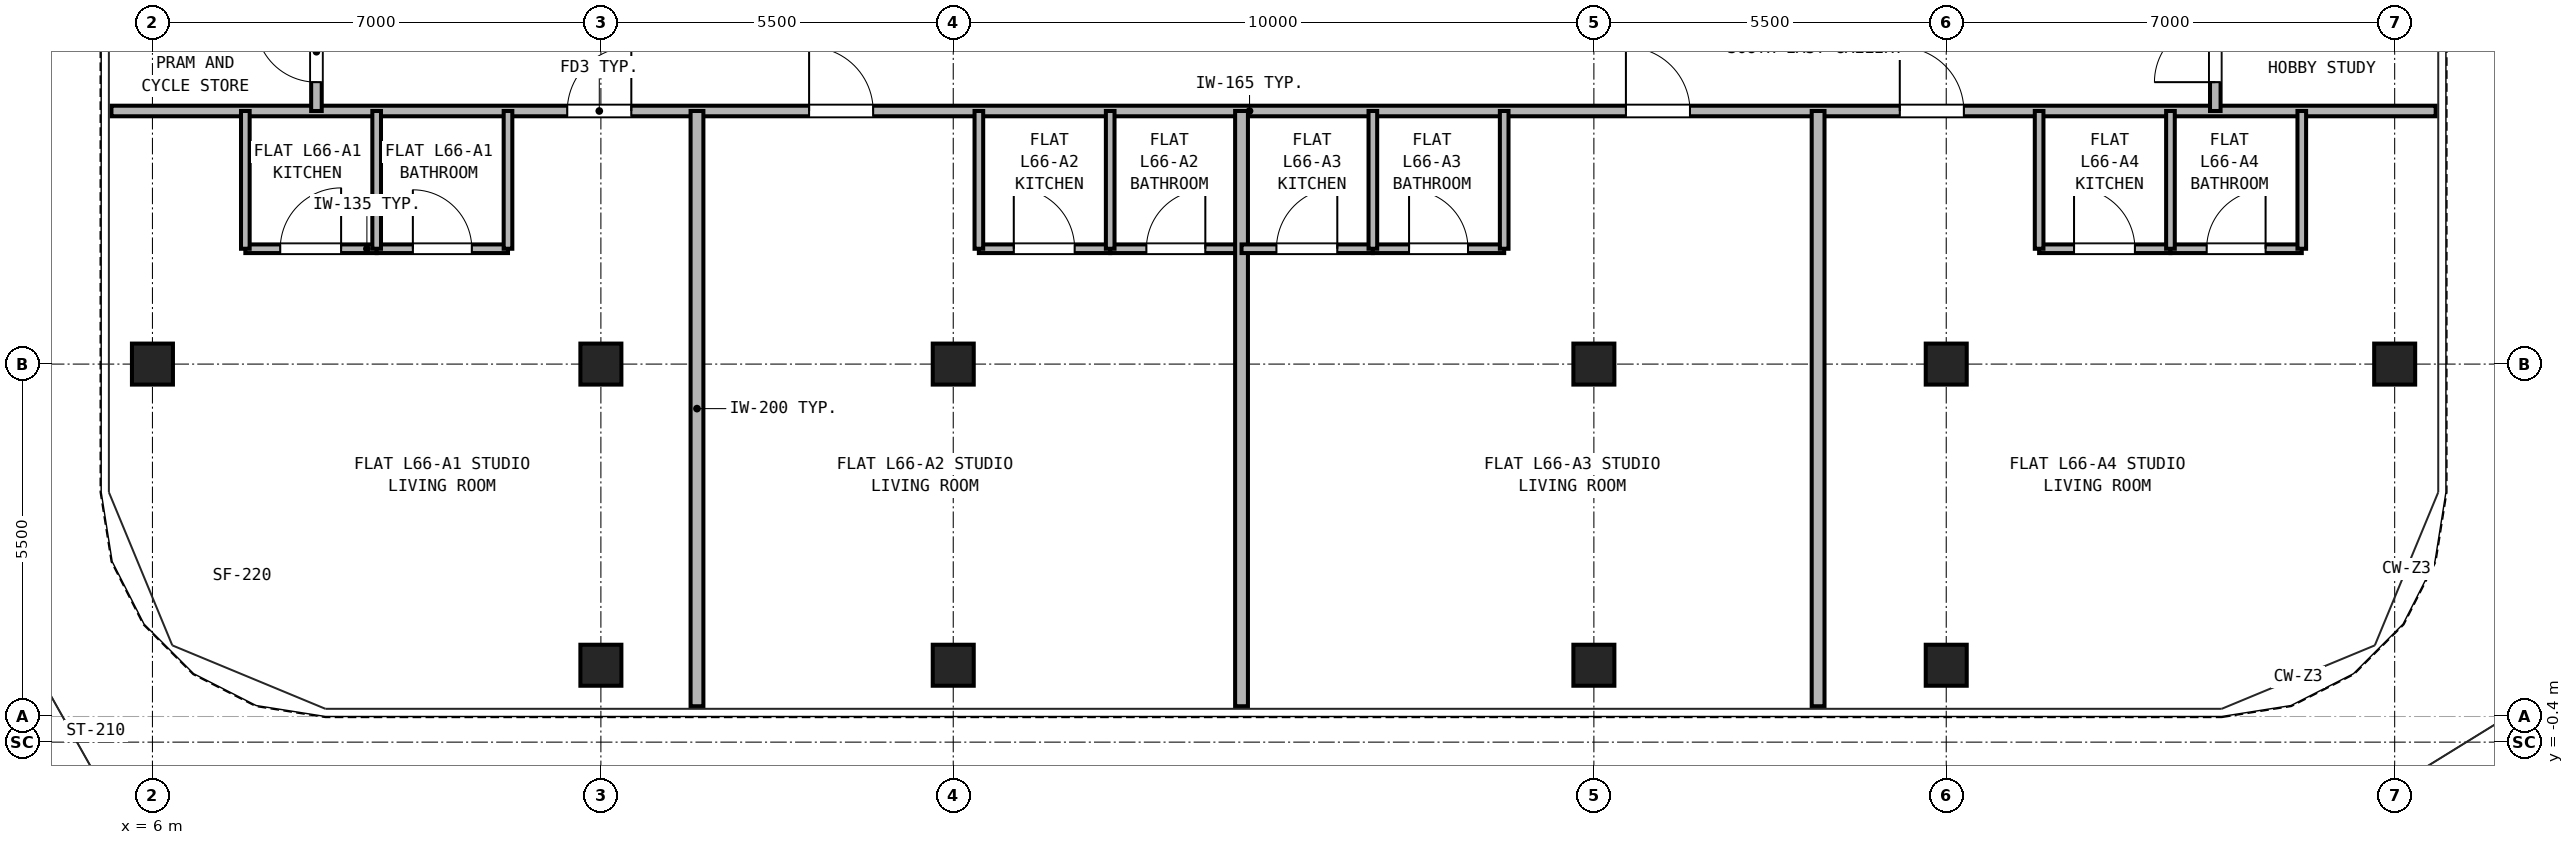
"""IFC4 building model, lengths in metres.
Left out: names, types, materials, properties, quantities, classifications, styles, units other than length and angle.
Written with IfcOpenShell. Run it as: python <this file> out.ifc"""

import sys

from ifc_helpers import new_model, si_unit, direction, frame, frame_2d, origin, origin_2d, place, context, subcontext, project, spatial, rectangle, hollow_rectangle, extrude, source, transform, mapped, element, fill, save


model = new_model("IFC4")
c1 = context("Model", 3, precision=1e-05, world=origin(), true_north=direction((0.0, 1.0)))
c2 = subcontext(c1, "Body", "Model", "MODEL_VIEW")
j1 = project(units=[si_unit("LENGTHUNIT", "METRE"), si_unit("PLANEANGLEUNIT", "RADIAN")], contexts=[c1])
p1 = place(None, origin())
s1 = spatial("IfcSite", under=j1, at=p1, CompositionType="ELEMENT")
p2 = place(p1, origin())
s2 = spatial("IfcBuilding", under=s1, at=p2, CompositionType="ELEMENT")
p3 = place(p2, frame((0.0, 0.0, 232.9)))
s3 = spatial("IfcBuildingStorey", under=s2, at=p3, CompositionType="ELEMENT", Elevation=232.9)
m1 = source(origin(), c2, "Body", "SweptSolid", [
    extrude(hollow_rectangle(XDim=0.64, YDim=0.64, WallThickness=0.035, at=origin_2d()), origin(), (0.0, 0.0, 1.0), 2.98),
])
for number, where, z_axis, x_axis in (
    (1, (13.0, 0.8, 0.0), (0.0, 0.0, 1.0), (1.0, 0.0, 0.0)),
    (2, (18.5, 0.8, 0.0), (0.0, 0.0, 1.0), (1.0, 0.0, 0.0)),
    (3, (28.5, 0.8, 0.0), (0.0, 0.0, 1.0), (1.0, 0.0, 0.0)),
    (4, (34.0, 0.8, 0.0), (0.0, 0.0, 1.0), (1.0, 0.0, 0.0)),
    (5, (6.0, 5.5, 0.0), (0.0, 0.0, 1.0), (1.0, 0.0, 0.0)),
    (6, (41.0, 5.5, 0.0), (0.0, 0.0, 1.0), (1.0, 0.0, 0.0)),
    (7, (13.0, 5.5, 0.0), (0.0, 0.0, 1.0), (1.0, 0.0, 0.0)),
    (8, (18.5, 5.5, 0.0), (0.0, 0.0, 1.0), (1.0, 0.0, 0.0)),
    (9, (28.5, 5.5, 0.0), (0.0, 0.0, 1.0), (1.0, 0.0, 0.0)),
    (10, (34.0, 5.5, 0.0), (0.0, 0.0, 1.0), (1.0, 0.0, 0.0)),
):
    element("IfcColumn", number, at=place(p3, frame(where, z_axis=z_axis, x_axis=x_axis)), inside=s3, PredefinedType="COLUMN", context=c2, shape_type="MappedRepresentation", body=[
        mapped(m1, transform((0.0, 0.0, 0.0), x_axis=(1.0, 0.0, 0.0), y_axis=(0.0, 1.0, 0.0), z_axis=(0.0, 0.0, 1.0), scale=1.0)),
    ])
p4 = place(p3, frame((5.36, 9.45, 0.0), z_axis=(0.0, 0.0, 1.0), x_axis=(1.0, 0.0, 0.0)))
e11 = element("IfcWall", 11, at=p4, inside=s3, PredefinedType="PARTITIONING", context=c2, shape_type="SweptSolid", body=[
    extrude(rectangle(XDim=36.28, YDim=0.165, at=frame_2d((18.14, 0.0))), origin(), (0.0, 0.0, 1.0), 2.98),
])
p5 = place(p4, frame((7.115, 0.0, 0.0)))
e12 = element("IfcOpeningElement", 12, at=p5, cuts=e11, PredefinedType="OPENING", context=c2, shape_type="SweptSolid", body=[
    extrude(rectangle(XDim=1.0, YDim=2.15, at=frame_2d((0.5, 1.075))), frame((0.0, 0.093, 0.0), z_axis=(0.0, -1.0, 0.0), x_axis=(1.0, 0.0, 0.0)), (0.0, 0.0, 1.0), 0.185),
])
p6 = place(p4, frame((10.89, 0.0, 0.0)))
e13 = element("IfcOpeningElement", 13, at=p6, cuts=e11, PredefinedType="OPENING", context=c2, shape_type="SweptSolid", body=[
    extrude(rectangle(XDim=1.0, YDim=2.15, at=frame_2d((0.5, 1.075))), frame((0.0, 0.093, 0.0), z_axis=(0.0, -1.0, 0.0), x_axis=(1.0, 0.0, 0.0)), (0.0, 0.0, 1.0), 0.185),
])
p7 = place(p4, frame((23.64, 0.0, 0.0)))
e14 = element("IfcOpeningElement", 14, at=p7, cuts=e11, PredefinedType="OPENING", context=c2, shape_type="SweptSolid", body=[
    extrude(rectangle(XDim=1.0, YDim=2.15, at=frame_2d((0.5, 1.075))), frame((0.0, 0.093, 0.0), z_axis=(0.0, -1.0, 0.0), x_axis=(1.0, 0.0, 0.0)), (0.0, 0.0, 1.0), 0.185),
])
p8 = place(p4, frame((27.915, 0.0, 0.0)))
e15 = element("IfcOpeningElement", 15, at=p8, cuts=e11, PredefinedType="OPENING", context=c2, shape_type="SweptSolid", body=[
    extrude(rectangle(XDim=1.0, YDim=2.15, at=frame_2d((0.5, 1.075))), frame((0.0, 0.093, 0.0), z_axis=(0.0, -1.0, 0.0), x_axis=(1.0, 0.0, 0.0)), (0.0, 0.0, 1.0), 0.185),
])
p9 = place(p3, frame((8.56, 9.45, 0.0), z_axis=(0.0, 0.0, 1.0), x_axis=(0.0, 1.0, 0.0)))
e16 = element("IfcWall", 16, at=p9, inside=s3, PredefinedType="PARTITIONING", context=c2, shape_type="SweptSolid", body=[
    extrude(rectangle(XDim=2.0, YDim=0.165, at=frame_2d((1.0, 0.0))), origin(), (0.0, 0.0, 1.0), 2.98),
])
p10 = place(p9, frame((0.45, 0.0, 0.0)))
e17 = element("IfcOpeningElement", 17, at=p10, cuts=e16, PredefinedType="OPENING", context=c2, shape_type="SweptSolid", body=[
    extrude(rectangle(XDim=0.95, YDim=2.15, at=frame_2d((0.475, 1.075))), frame((0.0, 0.093, 0.0), z_axis=(0.0, -1.0, 0.0), x_axis=(1.0, 0.0, 0.0)), (0.0, 0.0, 1.0), 0.185),
])
p11 = place(p3, frame((38.2, 9.45, 0.0), z_axis=(0.0, 0.0, 1.0), x_axis=(0.0, 1.0, 0.0)))
e18 = element("IfcWall", 18, at=p11, inside=s3, PredefinedType="PARTITIONING", context=c2, shape_type="SweptSolid", body=[
    extrude(rectangle(XDim=2.0, YDim=0.165, at=frame_2d((1.0, 0.0))), origin(), (0.0, 0.0, 1.0), 2.98),
])
p12 = place(p11, frame((0.45, 0.0, 0.0)))
e19 = element("IfcOpeningElement", 19, at=p12, cuts=e18, PredefinedType="OPENING", context=c2, shape_type="SweptSolid", body=[
    extrude(rectangle(XDim=0.95, YDim=2.15, at=frame_2d((0.475, 1.075))), frame((0.0, 0.093, 0.0), z_axis=(0.0, -1.0, 0.0), x_axis=(1.0, 0.0, 0.0)), (0.0, 0.0, 1.0), 0.185),
])
p13 = place(p3, frame((7.45, 7.3, 0.0), z_axis=(0.0, 0.0, 1.0), x_axis=(1.0, 0.0, 0.0)))
e20 = element("IfcWall", 20, at=p13, inside=s3, PredefinedType="PARTITIONING", context=c2, shape_type="SweptSolid", body=[
    extrude(rectangle(XDim=2.05, YDim=0.135, at=frame_2d((1.025, 0.0))), origin(), (0.0, 0.0, 1.0), 2.98),
])
p14 = place(p13, frame((0.545, 0.0, 0.0)))
e21 = element("IfcOpeningElement", 21, at=p14, cuts=e20, PredefinedType="OPENING", context=c2, shape_type="SweptSolid", body=[
    extrude(rectangle(XDim=0.95, YDim=2.15, at=frame_2d((0.475, 1.075))), frame((0.0, 0.077, 0.0), z_axis=(0.0, -1.0, 0.0), x_axis=(1.0, 0.0, 0.0)), (0.0, 0.0, 1.0), 0.155),
])
p15 = place(p3, frame((9.5, 7.3, 0.0), z_axis=(0.0, 0.0, 1.0), x_axis=(1.0, 0.0, 0.0)))
e22 = element("IfcWall", 22, at=p15, inside=s3, PredefinedType="PARTITIONING", context=c2, shape_type="SweptSolid", body=[
    extrude(rectangle(XDim=2.05, YDim=0.135, at=frame_2d((1.025, 0.0))), origin(), (0.0, 0.0, 1.0), 2.98),
])
p16 = place(p15, frame((0.565, 0.0, 0.0)))
e23 = element("IfcOpeningElement", 23, at=p16, cuts=e22, PredefinedType="OPENING", context=c2, shape_type="SweptSolid", body=[
    extrude(rectangle(XDim=0.92, YDim=2.1, at=frame_2d((0.46, 1.05))), frame((0.0, 0.077, 0.0), z_axis=(0.0, -1.0, 0.0), x_axis=(1.0, 0.0, 0.0)), (0.0, 0.0, 1.0), 0.155),
])
for number, where, z_axis, x_axis in (
    (24, (7.45, 7.3, 0.0), (0.0, 0.0, 1.0), (0.0, 1.0, 0.0)),
    (25, (9.5, 7.3, 0.0), (0.0, 0.0, 1.0), (0.0, 1.0, 0.0)),
    (26, (11.55, 7.3, 0.0), (0.0, 0.0, 1.0), (0.0, 1.0, 0.0)),
):
    element("IfcWall", number, at=place(p3, frame(where, z_axis=z_axis, x_axis=x_axis)), inside=s3, PredefinedType="PARTITIONING", context=c2, shape_type="SweptSolid", body=[
        extrude(rectangle(XDim=2.15, YDim=0.135, at=frame_2d((1.075, 0.0))), origin(), (0.0, 0.0, 1.0), 2.98),
    ])
p17 = place(p3, frame((14.5, 0.16, 0.0), z_axis=(0.0, 0.0, 1.0), x_axis=(0.0, 1.0, 0.0)))
e27 = element("IfcWall", 27, at=p17, inside=s3, PredefinedType="PARTITIONING", context=c2, shape_type="SweptSolid", body=[
    extrude(rectangle(XDim=9.29, YDim=0.2, at=frame_2d((4.645, 0.0))), origin(), (0.0, 0.0, 1.0), 2.98),
])
p18 = place(p3, frame((18.9, 7.3, 0.0), z_axis=(0.0, 0.0, 1.0), x_axis=(1.0, 0.0, 0.0)))
e28 = element("IfcWall", 28, at=p18, inside=s3, PredefinedType="PARTITIONING", context=c2, shape_type="SweptSolid", body=[
    extrude(rectangle(XDim=2.05, YDim=0.135, at=frame_2d((1.025, 0.0))), origin(), (0.0, 0.0, 1.0), 2.98),
])
p19 = place(p18, frame((0.545, 0.0, 0.0)))
e29 = element("IfcOpeningElement", 29, at=p19, cuts=e28, PredefinedType="OPENING", context=c2, shape_type="SweptSolid", body=[
    extrude(rectangle(XDim=0.95, YDim=2.15, at=frame_2d((0.475, 1.075))), frame((0.0, 0.077, 0.0), z_axis=(0.0, -1.0, 0.0), x_axis=(1.0, 0.0, 0.0)), (0.0, 0.0, 1.0), 0.155),
])
p20 = place(p3, frame((20.95, 7.3, 0.0), z_axis=(0.0, 0.0, 1.0), x_axis=(1.0, 0.0, 0.0)))
e30 = element("IfcWall", 30, at=p20, inside=s3, PredefinedType="PARTITIONING", context=c2, shape_type="SweptSolid", body=[
    extrude(rectangle(XDim=2.05, YDim=0.135, at=frame_2d((1.025, 0.0))), origin(), (0.0, 0.0, 1.0), 2.98),
])
p21 = place(p20, frame((0.565, 0.0, 0.0)))
e31 = element("IfcOpeningElement", 31, at=p21, cuts=e30, PredefinedType="OPENING", context=c2, shape_type="SweptSolid", body=[
    extrude(rectangle(XDim=0.92, YDim=2.1, at=frame_2d((0.46, 1.05))), frame((0.0, 0.077, 0.0), z_axis=(0.0, -1.0, 0.0), x_axis=(1.0, 0.0, 0.0)), (0.0, 0.0, 1.0), 0.155),
])
for number, where, z_axis, x_axis in (
    (32, (18.9, 7.3, 0.0), (0.0, 0.0, 1.0), (0.0, 1.0, 0.0)),
    (33, (20.95, 7.3, 0.0), (0.0, 0.0, 1.0), (0.0, 1.0, 0.0)),
):
    element("IfcWall", number, at=place(p3, frame(where, z_axis=z_axis, x_axis=x_axis)), inside=s3, PredefinedType="PARTITIONING", context=c2, shape_type="SweptSolid", body=[
        extrude(rectangle(XDim=2.15, YDim=0.135, at=frame_2d((1.075, 0.0))), origin(), (0.0, 0.0, 1.0), 2.98),
    ])
p22 = place(p3, frame((23.0, 0.16, 0.0), z_axis=(0.0, 0.0, 1.0), x_axis=(0.0, 1.0, 0.0)))
e34 = element("IfcWall", 34, at=p22, inside=s3, PredefinedType="PARTITIONING", context=c2, shape_type="SweptSolid", body=[
    extrude(rectangle(XDim=9.29, YDim=0.2, at=frame_2d((4.645, 0.0))), origin(), (0.0, 0.0, 1.0), 2.98),
])
p23 = place(p3, frame((23.0, 7.3, 0.0), z_axis=(0.0, 0.0, 1.0), x_axis=(1.0, 0.0, 0.0)))
e35 = element("IfcWall", 35, at=p23, inside=s3, PredefinedType="PARTITIONING", context=c2, shape_type="SweptSolid", body=[
    extrude(rectangle(XDim=2.05, YDim=0.135, at=frame_2d((1.025, 0.0))), origin(), (0.0, 0.0, 1.0), 2.98),
])
p24 = place(p23, frame((0.545, 0.0, 0.0)))
e36 = element("IfcOpeningElement", 36, at=p24, cuts=e35, PredefinedType="OPENING", context=c2, shape_type="SweptSolid", body=[
    extrude(rectangle(XDim=0.95, YDim=2.15, at=frame_2d((0.475, 1.075))), frame((0.0, 0.077, 0.0), z_axis=(0.0, -1.0, 0.0), x_axis=(1.0, 0.0, 0.0)), (0.0, 0.0, 1.0), 0.155),
])
p25 = place(p3, frame((25.05, 7.3, 0.0), z_axis=(0.0, 0.0, 1.0), x_axis=(1.0, 0.0, 0.0)))
e37 = element("IfcWall", 37, at=p25, inside=s3, PredefinedType="PARTITIONING", context=c2, shape_type="SweptSolid", body=[
    extrude(rectangle(XDim=2.05, YDim=0.135, at=frame_2d((1.025, 0.0))), origin(), (0.0, 0.0, 1.0), 2.98),
])
p26 = place(p25, frame((0.565, 0.0, 0.0)))
e38 = element("IfcOpeningElement", 38, at=p26, cuts=e37, PredefinedType="OPENING", context=c2, shape_type="SweptSolid", body=[
    extrude(rectangle(XDim=0.92, YDim=2.1, at=frame_2d((0.46, 1.05))), frame((0.0, 0.077, 0.0), z_axis=(0.0, -1.0, 0.0), x_axis=(1.0, 0.0, 0.0)), (0.0, 0.0, 1.0), 0.155),
])
for number, where, z_axis, x_axis in (
    (39, (25.05, 7.3, 0.0), (0.0, 0.0, 1.0), (0.0, 1.0, 0.0)),
    (40, (27.1, 7.3, 0.0), (0.0, 0.0, 1.0), (0.0, 1.0, 0.0)),
):
    element("IfcWall", number, at=place(p3, frame(where, z_axis=z_axis, x_axis=x_axis)), inside=s3, PredefinedType="PARTITIONING", context=c2, shape_type="SweptSolid", body=[
        extrude(rectangle(XDim=2.15, YDim=0.135, at=frame_2d((1.075, 0.0))), origin(), (0.0, 0.0, 1.0), 2.98),
    ])
p27 = place(p3, frame((32.0, 0.16, 0.0), z_axis=(0.0, 0.0, 1.0), x_axis=(0.0, 1.0, 0.0)))
e41 = element("IfcWall", 41, at=p27, inside=s3, PredefinedType="PARTITIONING", context=c2, shape_type="SweptSolid", body=[
    extrude(rectangle(XDim=9.29, YDim=0.2, at=frame_2d((4.645, 0.0))), origin(), (0.0, 0.0, 1.0), 2.98),
])
p28 = place(p3, frame((35.45, 7.3, 0.0), z_axis=(0.0, 0.0, 1.0), x_axis=(1.0, 0.0, 0.0)))
e42 = element("IfcWall", 42, at=p28, inside=s3, PredefinedType="PARTITIONING", context=c2, shape_type="SweptSolid", body=[
    extrude(rectangle(XDim=2.05, YDim=0.135, at=frame_2d((1.025, 0.0))), origin(), (0.0, 0.0, 1.0), 2.98),
])
p29 = place(p28, frame((0.545, 0.0, 0.0)))
e43 = element("IfcOpeningElement", 43, at=p29, cuts=e42, PredefinedType="OPENING", context=c2, shape_type="SweptSolid", body=[
    extrude(rectangle(XDim=0.95, YDim=2.15, at=frame_2d((0.475, 1.075))), frame((0.0, 0.077, 0.0), z_axis=(0.0, -1.0, 0.0), x_axis=(1.0, 0.0, 0.0)), (0.0, 0.0, 1.0), 0.155),
])
p30 = place(p3, frame((37.5, 7.3, 0.0), z_axis=(0.0, 0.0, 1.0), x_axis=(1.0, 0.0, 0.0)))
e44 = element("IfcWall", 44, at=p30, inside=s3, PredefinedType="PARTITIONING", context=c2, shape_type="SweptSolid", body=[
    extrude(rectangle(XDim=2.05, YDim=0.135, at=frame_2d((1.025, 0.0))), origin(), (0.0, 0.0, 1.0), 2.98),
])
p31 = place(p30, frame((0.565, 0.0, 0.0)))
e45 = element("IfcOpeningElement", 45, at=p31, cuts=e44, PredefinedType="OPENING", context=c2, shape_type="SweptSolid", body=[
    extrude(rectangle(XDim=0.92, YDim=2.1, at=frame_2d((0.46, 1.05))), frame((0.0, 0.077, 0.0), z_axis=(0.0, -1.0, 0.0), x_axis=(1.0, 0.0, 0.0)), (0.0, 0.0, 1.0), 0.155),
])
for number, where, z_axis, x_axis in (
    (46, (35.45, 7.3, 0.0), (0.0, 0.0, 1.0), (0.0, 1.0, 0.0)),
    (47, (37.5, 7.3, 0.0), (0.0, 0.0, 1.0), (0.0, 1.0, 0.0)),
    (48, (39.55, 7.3, 0.0), (0.0, 0.0, 1.0), (0.0, 1.0, 0.0)),
):
    element("IfcWall", number, at=place(p3, frame(where, z_axis=z_axis, x_axis=x_axis)), inside=s3, PredefinedType="PARTITIONING", context=c2, shape_type="SweptSolid", body=[
        extrude(rectangle(XDim=2.15, YDim=0.135, at=frame_2d((1.075, 0.0))), origin(), (0.0, 0.0, 1.0), 2.98),
    ])
p32 = place(p14, origin())
e49 = element("IfcDoor", 49, at=p32, inside=s3, OperationType="SINGLE_SWING_RIGHT", PredefinedType="DOOR", context=c2, shape_type="SweptSolid", body=[
    extrude(rectangle(XDim=0.95, YDim=2.15, at=frame_2d((0.475, 1.075))), frame((0.0, 0.025, 0.0), z_axis=(0.0, -1.0, 0.0), x_axis=(1.0, 0.0, 0.0)), (0.0, 0.0, 1.0), 0.05),
])
fill(e21, e49)
p33 = place(p16, origin())
e50 = element("IfcDoor", 50, at=p33, inside=s3, OperationType="SINGLE_SWING_LEFT", PredefinedType="DOOR", context=c2, shape_type="SweptSolid", body=[
    extrude(rectangle(XDim=0.92, YDim=2.1, at=frame_2d((0.46, 1.05))), frame((0.0, 0.025, 0.0), z_axis=(0.0, -1.0, 0.0), x_axis=(1.0, 0.0, 0.0)), (0.0, 0.0, 1.0), 0.05),
])
fill(e23, e50)
p34 = place(p5, frame((1.0, 0.0, 0.0), z_axis=(0.0, 0.0, 1.0), x_axis=(-1.0, 0.0, 0.0)))
e51 = element("IfcDoor", 51, at=p34, inside=s3, OperationType="SINGLE_SWING_RIGHT", PredefinedType="DOOR", context=c2, shape_type="SweptSolid", body=[
    extrude(rectangle(XDim=1.0, YDim=2.15, at=frame_2d((0.5, 1.075))), frame((0.0, 0.025, 0.0), z_axis=(0.0, -1.0, 0.0), x_axis=(1.0, 0.0, 0.0)), (0.0, 0.0, 1.0), 0.05),
])
fill(e12, e51)
p35 = place(p19, origin())
e52 = element("IfcDoor", 52, at=p35, inside=s3, OperationType="SINGLE_SWING_LEFT", PredefinedType="DOOR", context=c2, shape_type="SweptSolid", body=[
    extrude(rectangle(XDim=0.95, YDim=2.15, at=frame_2d((0.475, 1.075))), frame((0.0, 0.025, 0.0), z_axis=(0.0, -1.0, 0.0), x_axis=(1.0, 0.0, 0.0)), (0.0, 0.0, 1.0), 0.05),
])
fill(e29, e52)
p36 = place(p21, origin())
e53 = element("IfcDoor", 53, at=p36, inside=s3, OperationType="SINGLE_SWING_RIGHT", PredefinedType="DOOR", context=c2, shape_type="SweptSolid", body=[
    extrude(rectangle(XDim=0.92, YDim=2.1, at=frame_2d((0.46, 1.05))), frame((0.0, 0.025, 0.0), z_axis=(0.0, -1.0, 0.0), x_axis=(1.0, 0.0, 0.0)), (0.0, 0.0, 1.0), 0.05),
])
fill(e31, e53)
p37 = place(p6, frame((1.0, 0.0, 0.0), z_axis=(0.0, 0.0, 1.0), x_axis=(-1.0, 0.0, 0.0)))
e54 = element("IfcDoor", 54, at=p37, inside=s3, OperationType="SINGLE_SWING_LEFT", PredefinedType="DOOR", context=c2, shape_type="SweptSolid", body=[
    extrude(rectangle(XDim=1.0, YDim=2.15, at=frame_2d((0.5, 1.075))), frame((0.0, 0.025, 0.0), z_axis=(0.0, -1.0, 0.0), x_axis=(1.0, 0.0, 0.0)), (0.0, 0.0, 1.0), 0.05),
])
fill(e13, e54)
p38 = place(p24, origin())
e55 = element("IfcDoor", 55, at=p38, inside=s3, OperationType="SINGLE_SWING_RIGHT", PredefinedType="DOOR", context=c2, shape_type="SweptSolid", body=[
    extrude(rectangle(XDim=0.95, YDim=2.15, at=frame_2d((0.475, 1.075))), frame((0.0, 0.025, 0.0), z_axis=(0.0, -1.0, 0.0), x_axis=(1.0, 0.0, 0.0)), (0.0, 0.0, 1.0), 0.05),
])
fill(e36, e55)
p39 = place(p26, origin())
e56 = element("IfcDoor", 56, at=p39, inside=s3, OperationType="SINGLE_SWING_LEFT", PredefinedType="DOOR", context=c2, shape_type="SweptSolid", body=[
    extrude(rectangle(XDim=0.92, YDim=2.1, at=frame_2d((0.46, 1.05))), frame((0.0, 0.025, 0.0), z_axis=(0.0, -1.0, 0.0), x_axis=(1.0, 0.0, 0.0)), (0.0, 0.0, 1.0), 0.05),
])
fill(e38, e56)
p40 = place(p7, frame((1.0, 0.0, 0.0), z_axis=(0.0, 0.0, 1.0), x_axis=(-1.0, 0.0, 0.0)))
e57 = element("IfcDoor", 57, at=p40, inside=s3, OperationType="SINGLE_SWING_LEFT", PredefinedType="DOOR", context=c2, shape_type="SweptSolid", body=[
    extrude(rectangle(XDim=1.0, YDim=2.15, at=frame_2d((0.5, 1.075))), frame((0.0, 0.025, 0.0), z_axis=(0.0, -1.0, 0.0), x_axis=(1.0, 0.0, 0.0)), (0.0, 0.0, 1.0), 0.05),
])
fill(e14, e57)
p41 = place(p29, origin())
e58 = element("IfcDoor", 58, at=p41, inside=s3, OperationType="SINGLE_SWING_LEFT", PredefinedType="DOOR", context=c2, shape_type="SweptSolid", body=[
    extrude(rectangle(XDim=0.95, YDim=2.15, at=frame_2d((0.475, 1.075))), frame((0.0, 0.025, 0.0), z_axis=(0.0, -1.0, 0.0), x_axis=(1.0, 0.0, 0.0)), (0.0, 0.0, 1.0), 0.05),
])
fill(e43, e58)
p42 = place(p31, origin())
e59 = element("IfcDoor", 59, at=p42, inside=s3, OperationType="SINGLE_SWING_RIGHT", PredefinedType="DOOR", context=c2, shape_type="SweptSolid", body=[
    extrude(rectangle(XDim=0.92, YDim=2.1, at=frame_2d((0.46, 1.05))), frame((0.0, 0.025, 0.0), z_axis=(0.0, -1.0, 0.0), x_axis=(1.0, 0.0, 0.0)), (0.0, 0.0, 1.0), 0.05),
])
fill(e45, e59)
p43 = place(p8, frame((1.0, 0.0, 0.0), z_axis=(0.0, 0.0, 1.0), x_axis=(-1.0, 0.0, 0.0)))
e60 = element("IfcDoor", 60, at=p43, inside=s3, OperationType="SINGLE_SWING_LEFT", PredefinedType="DOOR", context=c2, shape_type="SweptSolid", body=[
    extrude(rectangle(XDim=1.0, YDim=2.15, at=frame_2d((0.5, 1.075))), frame((0.0, 0.025, 0.0), z_axis=(0.0, -1.0, 0.0), x_axis=(1.0, 0.0, 0.0)), (0.0, 0.0, 1.0), 0.05),
])
fill(e15, e60)
p44 = place(p10, frame((0.95, 0.0, 0.0), z_axis=(0.0, 0.0, 1.0), x_axis=(-1.0, 0.0, 0.0)))
e61 = element("IfcDoor", 61, at=p44, inside=s3, OperationType="SINGLE_SWING_RIGHT", PredefinedType="DOOR", context=c2, shape_type="SweptSolid", body=[
    extrude(rectangle(XDim=0.95, YDim=2.15, at=frame_2d((0.475, 1.075))), frame((0.0, 0.025, 0.0), z_axis=(0.0, -1.0, 0.0), x_axis=(1.0, 0.0, 0.0)), (0.0, 0.0, 1.0), 0.05),
])
fill(e17, e61)
p45 = place(p12, origin())
e62 = element("IfcDoor", 62, at=p45, inside=s3, OperationType="SINGLE_SWING_LEFT", PredefinedType="DOOR", context=c2, shape_type="SweptSolid", body=[
    extrude(rectangle(XDim=0.95, YDim=2.15, at=frame_2d((0.475, 1.075))), frame((0.0, 0.025, 0.0), z_axis=(0.0, -1.0, 0.0), x_axis=(1.0, 0.0, 0.0)), (0.0, 0.0, 1.0), 0.05),
])
fill(e19, e62)
save(model, sys.argv[1])
